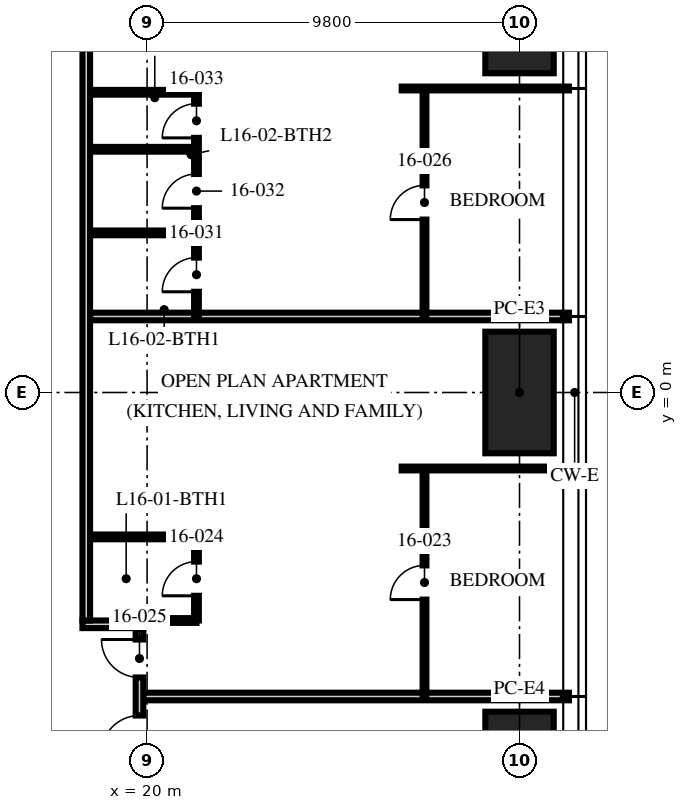
"""IFC4 building model, lengths in metres.
Left out: names, types, materials, properties, quantities, classifications, styles, units other than length and angle.
Written with IfcOpenShell. Run it as: python <this file> out.ifc"""

import sys

from ifc_helpers import new_model, si_unit, direction, frame, frame_2d, origin, origin_2d, place, context, subcontext, project, spatial, rectangle, hollow_rectangle, extrude, element, fill, save


model = new_model("IFC4")
c1 = context("Model", 3, precision=1e-05, world=origin(), true_north=direction((0.0, 1.0)))
c2 = subcontext(c1, "Body", "Model", "MODEL_VIEW")
j1 = project(units=[si_unit("LENGTHUNIT", "METRE"), si_unit("PLANEANGLEUNIT", "RADIAN")], contexts=[c1])
p1 = place(None, origin())
s1 = spatial("IfcSite", under=j1, at=p1, CompositionType="ELEMENT")
p2 = place(p1, origin())
s2 = spatial("IfcBuilding", under=s1, at=p2, CompositionType="ELEMENT")
p3 = place(p2, frame((0.0, 0.0, 66.0)))
s3 = spatial("IfcBuildingStorey", under=s2, at=p3, CompositionType="ELEMENT", Elevation=66.0)
for number, where, z_axis, x_axis in (
    (1, (29.8, 10.0, 0.0), (0.0, 0.0, 1.0), (0.0, 1.0, 0.0)),
    (2, (29.8, 0.0, 0.0), (0.0, 0.0, 1.0), (0.0, 1.0, 0.0)),
    (3, (29.8, -10.0, 0.0), (0.0, 0.0, 1.0), (0.0, 1.0, 0.0)),
):
    element("IfcColumn", number, at=place(p3, frame(where, z_axis=z_axis, x_axis=x_axis)), inside=s3, PredefinedType="COLUMN", context=c2, shape_type="SweptSolid", body=[
        extrude(hollow_rectangle(XDim=3.2, YDim=1.8, WallThickness=0.2, at=origin_2d()), origin(), (0.0, 0.0, 1.0), 3.75),
    ])
p4 = place(p3, frame((19.9, -8.0, 0.0), z_axis=(0.0, 0.0, 1.0), x_axis=(1.0, 0.0, 0.0)))
e4 = element("IfcWall", 4, at=p4, inside=s3, PredefinedType="PARTITIONING", context=c2, shape_type="SweptSolid", body=[
    extrude(rectangle(XDim=11.2, YDim=0.2, at=frame_2d((5.6, 0.0))), origin(), (0.0, 0.0, 1.0), 2.71),
])
p5 = place(p3, frame((26.7, -2.0, 0.0), z_axis=(0.0, 0.0, 1.0), x_axis=(1.0, 0.0, 0.0)))
e5 = element("IfcWall", 5, at=p5, inside=s3, PredefinedType="PARTITIONING", context=c2, shape_type="SweptSolid", body=[
    extrude(rectangle(XDim=4.4, YDim=0.1, at=frame_2d((2.2, 0.0))), origin(), (0.0, 0.0, 1.0), 2.71),
])
p6 = place(p3, frame((18.5, 2.0, 0.0), z_axis=(0.0, 0.0, 1.0), x_axis=(1.0, 0.0, 0.0)))
e6 = element("IfcWall", 6, at=p6, inside=s3, PredefinedType="PARTITIONING", context=c2, shape_type="SweptSolid", body=[
    extrude(rectangle(XDim=12.6, YDim=0.2, at=frame_2d((6.3, 0.0))), origin(), (0.0, 0.0, 1.0), 2.71),
])
p7 = place(p3, frame((26.7, 8.0, 0.0), z_axis=(0.0, 0.0, 1.0), x_axis=(1.0, 0.0, 0.0)))
e7 = element("IfcWall", 7, at=p7, inside=s3, PredefinedType="PARTITIONING", context=c2, shape_type="SweptSolid", body=[
    extrude(rectangle(XDim=4.4, YDim=0.1, at=frame_2d((2.2, 0.0))), origin(), (0.0, 0.0, 1.0), 2.71),
])
p8 = place(p3, frame((27.3, -8.0, 0.0), z_axis=(0.0, 0.0, 1.0), x_axis=(0.0, 1.0, 0.0)))
e8 = element("IfcWall", 8, at=p8, inside=s3, PredefinedType="PARTITIONING", context=c2, shape_type="SweptSolid", body=[
    extrude(rectangle(XDim=6.0, YDim=0.1, at=frame_2d((3.0, 0.0))), origin(), (0.0, 0.0, 1.0), 2.61),
])
p9 = place(p8, frame((2.55, 0.0, 0.0)))
e9 = element("IfcOpeningElement", 9, at=p9, cuts=e8, PredefinedType="OPENING", context=c2, shape_type="SweptSolid", body=[
    extrude(rectangle(XDim=0.9, YDim=2.1, at=frame_2d((0.45, 1.05))), frame((0.0, 0.06, 0.0), z_axis=(0.0, -1.0, 0.0), x_axis=(1.0, 0.0, 0.0)), (0.0, 0.0, 1.0), 0.12),
])
p10 = place(p3, frame((21.3, -6.0, 0.0), z_axis=(0.0, 0.0, 1.0), x_axis=(0.0, 1.0, 0.0)))
e10 = element("IfcWall", 10, at=p10, inside=s3, PredefinedType="PARTITIONING", context=c2, shape_type="SweptSolid", body=[
    extrude(rectangle(XDim=2.2, YDim=0.125, at=frame_2d((1.1, 0.0))), origin(), (0.0, 0.0, 1.0), 2.61),
])
p11 = place(p10, frame((0.65, 0.0, 0.0)))
e11 = element("IfcOpeningElement", 11, at=p11, cuts=e10, PredefinedType="OPENING", context=c2, shape_type="SweptSolid", body=[
    extrude(rectangle(XDim=0.9, YDim=2.1, at=frame_2d((0.45, 1.05))), frame((0.0, 0.073, 0.0), z_axis=(0.0, -1.0, 0.0), x_axis=(1.0, 0.0, 0.0)), (0.0, 0.0, 1.0), 0.145),
])
p12 = place(p3, frame((19.97, -6.0, 0.0), z_axis=(0.0, 0.0, 1.0), x_axis=(1.0, 0.0, 0.0)))
e12 = element("IfcWall", 12, at=p12, inside=s3, PredefinedType="PARTITIONING", context=c2, shape_type="SweptSolid", body=[
    extrude(rectangle(XDim=1.33, YDim=0.125, at=frame_2d((0.665, 0.0))), origin(), (0.0, 0.0, 1.0), 3.5),
])
p13 = place(p3, frame((18.5, -3.8, 0.0), z_axis=(0.0, 0.0, 1.0), x_axis=(1.0, 0.0, 0.0)))
e13 = element("IfcWall", 13, at=p13, inside=s3, PredefinedType="PARTITIONING", context=c2, shape_type="SweptSolid", body=[
    extrude(rectangle(XDim=2.8, YDim=0.125, at=frame_2d((1.4, 0.0))), origin(), (0.0, 0.0, 1.0), 3.5),
])
p14 = place(p3, frame((27.3, 2.0, 0.0), z_axis=(0.0, 0.0, 1.0), x_axis=(0.0, 1.0, 0.0)))
e14 = element("IfcWall", 14, at=p14, inside=s3, PredefinedType="PARTITIONING", context=c2, shape_type="SweptSolid", body=[
    extrude(rectangle(XDim=6.0, YDim=0.1, at=frame_2d((3.0, 0.0))), origin(), (0.0, 0.0, 1.0), 2.61),
])
p15 = place(p14, frame((2.55, 0.0, 0.0)))
e15 = element("IfcOpeningElement", 15, at=p15, cuts=e14, PredefinedType="OPENING", context=c2, shape_type="SweptSolid", body=[
    extrude(rectangle(XDim=0.9, YDim=2.1, at=frame_2d((0.45, 1.05))), frame((0.0, 0.06, 0.0), z_axis=(0.0, -1.0, 0.0), x_axis=(1.0, 0.0, 0.0)), (0.0, 0.0, 1.0), 0.12),
])
p16 = place(p3, frame((21.3, 2.0, 0.0), z_axis=(0.0, 0.0, 1.0), x_axis=(0.0, 1.0, 0.0)))
e16 = element("IfcWall", 16, at=p16, inside=s3, PredefinedType="PARTITIONING", context=c2, shape_type="SweptSolid", body=[
    extrude(rectangle(XDim=5.9, YDim=0.125, at=frame_2d((2.95, 0.0))), origin(), (0.0, 0.0, 1.0), 2.61),
])
p17 = place(p16, frame((0.65, 0.0, 0.0)))
e17 = element("IfcOpeningElement", 17, at=p17, cuts=e16, PredefinedType="OPENING", context=c2, shape_type="SweptSolid", body=[
    extrude(rectangle(XDim=0.9, YDim=2.1, at=frame_2d((0.45, 1.05))), frame((0.0, 0.073, 0.0), z_axis=(0.0, -1.0, 0.0), x_axis=(1.0, 0.0, 0.0)), (0.0, 0.0, 1.0), 0.145),
])
p18 = place(p16, frame((2.85, 0.0, 0.0)))
e18 = element("IfcOpeningElement", 18, at=p18, cuts=e16, PredefinedType="OPENING", context=c2, shape_type="SweptSolid", body=[
    extrude(rectangle(XDim=0.9, YDim=2.1, at=frame_2d((0.45, 1.05))), frame((0.0, 0.073, 0.0), z_axis=(0.0, -1.0, 0.0), x_axis=(1.0, 0.0, 0.0)), (0.0, 0.0, 1.0), 0.145),
])
p19 = place(p16, frame((4.7, 0.0, 0.0)))
e19 = element("IfcOpeningElement", 19, at=p19, cuts=e16, PredefinedType="OPENING", context=c2, shape_type="SweptSolid", body=[
    extrude(rectangle(XDim=0.9, YDim=2.1, at=frame_2d((0.45, 1.05))), frame((0.0, 0.073, 0.0), z_axis=(0.0, -1.0, 0.0), x_axis=(1.0, 0.0, 0.0)), (0.0, 0.0, 1.0), 0.145),
])
for number, where, z_axis, x_axis in (
    (20, (18.5, 4.2, 0.0), (0.0, 0.0, 1.0), (1.0, 0.0, 0.0)),
    (21, (18.5, 6.4, 0.0), (0.0, 0.0, 1.0), (1.0, 0.0, 0.0)),
    (22, (18.5, 7.9, 0.0), (0.0, 0.0, 1.0), (1.0, 0.0, 0.0)),
):
    element("IfcWall", number, at=place(p3, frame(where, z_axis=z_axis, x_axis=x_axis)), inside=s3, PredefinedType="PARTITIONING", context=c2, shape_type="SweptSolid", body=[
        extrude(rectangle(XDim=2.8, YDim=0.125, at=frame_2d((1.4, 0.0))), origin(), (0.0, 0.0, 1.0), 3.5),
    ])
p20 = place(p3, frame((18.3, -6.1, 0.0), z_axis=(0.0, 0.0, 1.0), x_axis=(1.0, 0.0, 0.0)))
e23 = element("IfcWall", 23, at=p20, inside=s3, PredefinedType="PARTITIONING", context=c2, shape_type="SweptSolid", body=[
    extrude(rectangle(XDim=1.6, YDim=0.2, at=frame_2d((0.8, 0.0))), origin(), (0.0, 0.0, 1.0), 3.5),
])
p21 = place(p3, frame((19.8, -9.8, 0.0), z_axis=(0.0, 0.0, 1.0), x_axis=(0.0, 1.0, 0.0)))
e24 = element("IfcWall", 24, at=p21, inside=s3, PredefinedType="PARTITIONING", context=c2, shape_type="SweptSolid", body=[
    extrude(rectangle(XDim=3.6, YDim=0.2, at=frame_2d((1.8, 0.0))), origin(), (0.0, 0.0, 1.0), 3.5),
])
p22 = place(p21, frame((2.3, 0.0, 0.0)))
e25 = element("IfcOpeningElement", 25, at=p22, cuts=e24, PredefinedType="OPENING", context=c2, shape_type="SweptSolid", body=[
    extrude(rectangle(XDim=1.0, YDim=2.2, at=frame_2d((0.5, 1.1))), frame((0.0, 0.11, 0.0), z_axis=(0.0, -1.0, 0.0), x_axis=(1.0, 0.0, 0.0)), (0.0, 0.0, 1.0), 0.22),
])
p23 = place(p21, frame((0.3, 0.0, 0.0)))
e26 = element("IfcOpeningElement", 26, at=p23, cuts=e24, PredefinedType="OPENING", context=c2, shape_type="SweptSolid", body=[
    extrude(rectangle(XDim=1.0, YDim=2.2, at=frame_2d((0.5, 1.1))), frame((0.0, 0.11, 0.0), z_axis=(0.0, -1.0, 0.0), x_axis=(1.0, 0.0, 0.0)), (0.0, 0.0, 1.0), 0.22),
])
p24 = place(p3, frame((18.4, -6.0, 0.0), z_axis=(0.0, 0.0, 1.0), x_axis=(0.0, 1.0, 0.0)))
e27 = element("IfcWall", 27, at=p24, inside=s3, PredefinedType="PARTITIONING", context=c2, shape_type="SweptSolid", body=[
    extrude(rectangle(XDim=24.3, YDim=0.2, at=frame_2d((12.15, 0.0))), origin(), (0.0, 0.0, 1.0), 2.3),
])
p25 = place(p9, origin())
e28 = element("IfcDoor", 28, at=p25, inside=s3, OperationType="SINGLE_SWING_LEFT", PredefinedType="DOOR", context=c2, shape_type="SweptSolid", body=[
    extrude(rectangle(XDim=0.9, YDim=2.1, at=frame_2d((0.45, 1.05))), frame((0.0, 0.025, 0.0), z_axis=(0.0, -1.0, 0.0), x_axis=(1.0, 0.0, 0.0)), (0.0, 0.0, 1.0), 0.05),
])
fill(e9, e28)
p26 = place(p11, origin())
e29 = element("IfcDoor", 29, at=p26, inside=s3, OperationType="SINGLE_SWING_LEFT", PredefinedType="DOOR", context=c2, shape_type="SweptSolid", body=[
    extrude(rectangle(XDim=0.9, YDim=2.1, at=frame_2d((0.45, 1.05))), frame((0.0, 0.025, 0.0), z_axis=(0.0, -1.0, 0.0), x_axis=(1.0, 0.0, 0.0)), (0.0, 0.0, 1.0), 0.05),
])
fill(e11, e29)
p27 = place(p22, origin())
e30 = element("IfcDoor", 30, at=p27, inside=s3, OperationType="SINGLE_SWING_RIGHT", PredefinedType="DOOR", context=c2, shape_type="SweptSolid", body=[
    extrude(rectangle(XDim=1.0, YDim=2.2, at=frame_2d((0.5, 1.1))), frame((0.0, 0.025, 0.0), z_axis=(0.0, -1.0, 0.0), x_axis=(1.0, 0.0, 0.0)), (0.0, 0.0, 1.0), 0.05),
])
fill(e25, e30)
p28 = place(p15, origin())
e31 = element("IfcDoor", 31, at=p28, inside=s3, OperationType="SINGLE_SWING_LEFT", PredefinedType="DOOR", context=c2, shape_type="SweptSolid", body=[
    extrude(rectangle(XDim=0.9, YDim=2.1, at=frame_2d((0.45, 1.05))), frame((0.0, 0.025, 0.0), z_axis=(0.0, -1.0, 0.0), x_axis=(1.0, 0.0, 0.0)), (0.0, 0.0, 1.0), 0.05),
])
fill(e15, e31)
p29 = place(p17, origin())
e32 = element("IfcDoor", 32, at=p29, inside=s3, OperationType="SINGLE_SWING_LEFT", PredefinedType="DOOR", context=c2, shape_type="SweptSolid", body=[
    extrude(rectangle(XDim=0.9, YDim=2.1, at=frame_2d((0.45, 1.05))), frame((0.0, 0.025, 0.0), z_axis=(0.0, -1.0, 0.0), x_axis=(1.0, 0.0, 0.0)), (0.0, 0.0, 1.0), 0.05),
])
fill(e17, e32)
p30 = place(p18, origin())
e33 = element("IfcDoor", 33, at=p30, inside=s3, OperationType="SINGLE_SWING_LEFT", PredefinedType="DOOR", context=c2, shape_type="SweptSolid", body=[
    extrude(rectangle(XDim=0.9, YDim=2.1, at=frame_2d((0.45, 1.05))), frame((0.0, 0.025, 0.0), z_axis=(0.0, -1.0, 0.0), x_axis=(1.0, 0.0, 0.0)), (0.0, 0.0, 1.0), 0.05),
])
fill(e18, e33)
p31 = place(p19, origin())
e34 = element("IfcDoor", 34, at=p31, inside=s3, OperationType="SINGLE_SWING_LEFT", PredefinedType="DOOR", context=c2, shape_type="SweptSolid", body=[
    extrude(rectangle(XDim=0.9, YDim=2.1, at=frame_2d((0.45, 1.05))), frame((0.0, 0.025, 0.0), z_axis=(0.0, -1.0, 0.0), x_axis=(1.0, 0.0, 0.0)), (0.0, 0.0, 1.0), 0.05),
])
fill(e19, e34)
p32 = place(p23, origin())
e35 = element("IfcDoor", 35, at=p32, inside=s3, OperationType="SINGLE_SWING_LEFT", PredefinedType="DOOR", context=c2, shape_type="SweptSolid", body=[
    extrude(rectangle(XDim=1.0, YDim=2.2, at=frame_2d((0.5, 1.1))), frame((0.0, 0.025, 0.0), z_axis=(0.0, -1.0, 0.0), x_axis=(1.0, 0.0, 0.0)), (0.0, 0.0, 1.0), 0.05),
])
fill(e26, e35)
save(model, sys.argv[1])
